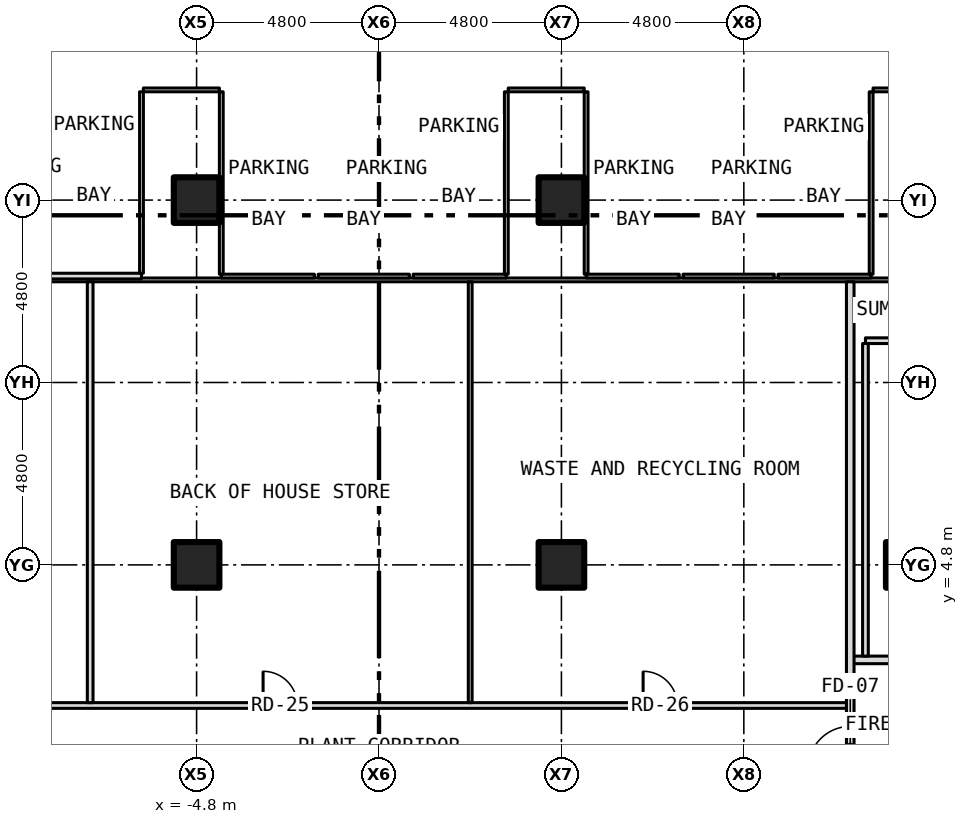
"""IFC4 building model, lengths in metres.
Left out: names, types, materials, properties, quantities, classifications, styles, units other than length and angle.
Written with IfcOpenShell. Run it as: python <this file> out.ifc"""

import sys

from ifc_helpers import new_model, si_unit, direction, frame, frame_2d, origin, origin_2d, place, context, subcontext, project, spatial, rectangle, hollow_rectangle, extrude, element, fill, save


model = new_model("IFC4")
c1 = context("Model", 3, precision=1e-05, world=origin(), true_north=direction((0.0, 1.0)))
c2 = subcontext(c1, "Body", "Model", "MODEL_VIEW")
j1 = project(units=[si_unit("LENGTHUNIT", "METRE"), si_unit("PLANEANGLEUNIT", "RADIAN")], contexts=[c1])
p1 = place(None, origin())
s1 = spatial("IfcSite", under=j1, at=p1, CompositionType="ELEMENT")
p2 = place(p1, origin())
s2 = spatial("IfcBuilding", under=s1, at=p2, CompositionType="ELEMENT")
p3 = place(p2, frame((0.0, 0.0, -10.0)))
s3 = spatial("IfcBuildingStorey", under=s2, at=p3, CompositionType="ELEMENT", Elevation=-10.0)
for number, where, z_axis, x_axis in (
    (1, (-4.8, 4.8, -0.6), (0.0, 0.0, 1.0), (1.0, 0.0, 0.0)),
    (2, (-4.8, 14.4, -0.6), (0.0, 0.0, 1.0), (1.0, 0.0, 0.0)),
    (3, (4.8, 4.8, -0.6), (0.0, 0.0, 1.0), (1.0, 0.0, 0.0)),
    (4, (4.8, 14.4, -0.6), (0.0, 0.0, 1.0), (1.0, 0.0, 0.0)),
    (5, (13.94, 4.8, -0.6), (0.0, 0.0, 1.0), (1.0, 0.0, 0.0)),
):
    element("IfcColumn", number, at=place(p3, frame(where, z_axis=z_axis, x_axis=x_axis)), inside=s3, PredefinedType="COLUMN", context=c2, shape_type="SweptSolid", body=[
        extrude(hollow_rectangle(XDim=1.2, YDim=1.2, WallThickness=0.07, at=origin_2d()), origin(), (0.0, 0.0, 1.0), 5.3),
    ])
p4 = place(p3, frame((-12.4, 1.1, 0.0), z_axis=(0.0, 0.0, 1.0), x_axis=(1.0, 0.0, 0.0)))
e6 = element("IfcWall", 6, at=p4, inside=s3, PredefinedType="PARTITIONING", context=c2, shape_type="SweptSolid", body=[
    extrude(rectangle(XDim=24.8, YDim=0.15, at=frame_2d((12.4, 0.0))), origin(), (0.0, 0.0, 1.0), 4.7),
])
p5 = place(p4, frame((9.35, 0.0, 0.0)))
e7 = element("IfcOpeningElement", 7, at=p5, cuts=e6, PredefinedType="OPENING", context=c2, shape_type="SweptSolid", body=[
    extrude(rectangle(XDim=0.9, YDim=2.1, at=frame_2d((0.45, 1.05))), frame((0.0, 0.087, 0.0), z_axis=(0.0, -1.0, 0.0), x_axis=(1.0, 0.0, 0.0)), (0.0, 0.0, 1.0), 0.174),
])
p6 = place(p4, frame((19.35, 0.0, 0.0)))
e8 = element("IfcOpeningElement", 8, at=p6, cuts=e6, PredefinedType="OPENING", context=c2, shape_type="SweptSolid", body=[
    extrude(rectangle(XDim=0.9, YDim=2.1, at=frame_2d((0.45, 1.05))), frame((0.0, 0.087, 0.0), z_axis=(0.0, -1.0, 0.0), x_axis=(1.0, 0.0, 0.0)), (0.0, 0.0, 1.0), 0.174),
])
p7 = place(p3, frame((12.4, 2.3, 0.0), z_axis=(0.0, 0.0, 1.0), x_axis=(1.0, 0.0, 0.0)))
e9 = element("IfcWall", 9, at=p7, inside=s3, PredefinedType="PARTITIONING", context=c2, shape_type="SweptSolid", body=[
    extrude(rectangle(XDim=3.28, YDim=0.2, at=frame_2d((1.64, 0.0))), origin(), (0.0, 0.0, 1.0), 4.7),
])
p8 = place(p7, frame((1.34, 0.0, 0.0)))
e10 = element("IfcOpeningElement", 10, at=p8, cuts=e9, PredefinedType="OPENING", context=c2, shape_type="SweptSolid", body=[
    extrude(rectangle(XDim=1.1, YDim=2.1, at=frame_2d((0.55, 1.05))), frame((0.0, 0.112, 0.0), z_axis=(0.0, -1.0, 0.0), x_axis=(1.0, 0.0, 0.0)), (0.0, 0.0, 1.0), 0.224),
])
p9 = place(p3, frame((12.8, 10.7, 0.0), z_axis=(0.0, 0.0, 1.0), x_axis=(1.0, 0.0, 0.0)))
e11 = element("IfcWall", 11, at=p9, inside=s3, PredefinedType="PARTITIONING", context=c2, shape_type="SweptSolid", body=[
    extrude(rectangle(XDim=2.88, YDim=0.15, at=frame_2d((1.44, 0.0))), origin(), (0.0, 0.0, 1.0), 4.7),
])
p10 = place(p9, frame((1.05, 0.0, 0.0)))
e12 = element("IfcOpeningElement", 12, at=p10, cuts=e11, PredefinedType="OPENING", context=c2, shape_type="SweptSolid", body=[
    extrude(rectangle(XDim=0.9, YDim=2.1, at=frame_2d((0.45, 1.05))), frame((0.0, 0.087, 0.0), z_axis=(0.0, -1.0, 0.0), x_axis=(1.0, 0.0, 0.0)), (0.0, 0.0, 1.0), 0.174),
])
p11 = place(p3, frame((-37.6, 12.3, 0.0), z_axis=(0.0, 0.0, 1.0), x_axis=(1.0, 0.0, 0.0)))
e13 = element("IfcWall", 13, at=p11, inside=s3, PredefinedType="PARTITIONING", context=c2, shape_type="SweptSolid", body=[
    extrude(rectangle(XDim=70.0, YDim=0.1, at=frame_2d((35.0, 0.0))), origin(), (0.0, 0.0, 1.0), 4.7),
])
p12 = place(p3, frame((-8.7, 12.4, 0.0), z_axis=(0.0, 0.0, 1.0), x_axis=(1.0, 0.0, 0.0)))
e14 = element("IfcWall", 14, at=p12, inside=s3, PredefinedType="PARTITIONING", context=c2, shape_type="SweptSolid", body=[
    extrude(rectangle(XDim=2.45, YDim=0.15, at=frame_2d((1.225, 0.0))), origin(), (0.0, 0.0, 1.0), 4.7),
])
p13 = place(p3, frame((-4.15, 12.4, 0.0), z_axis=(0.0, 0.0, 1.0), x_axis=(1.0, 0.0, 0.0)))
e15 = element("IfcWall", 15, at=p13, inside=s3, PredefinedType="PARTITIONING", context=c2, shape_type="SweptSolid", body=[
    extrude(rectangle(XDim=2.45, YDim=0.1, at=frame_2d((1.225, 0.0))), origin(), (0.0, 0.0, 1.0), 4.7),
])
p14 = place(p3, frame((-1.6, 12.4, 0.0), z_axis=(0.0, 0.0, 1.0), x_axis=(1.0, 0.0, 0.0)))
e16 = element("IfcWall", 16, at=p14, inside=s3, PredefinedType="PARTITIONING", context=c2, shape_type="SweptSolid", body=[
    extrude(rectangle(XDim=2.4, YDim=0.1, at=frame_2d((1.2, 0.0))), origin(), (0.0, 0.0, 1.0), 4.7),
])
p15 = place(p3, frame((0.9, 12.4, 0.0), z_axis=(0.0, 0.0, 1.0), x_axis=(1.0, 0.0, 0.0)))
e17 = element("IfcWall", 17, at=p15, inside=s3, PredefinedType="PARTITIONING", context=c2, shape_type="SweptSolid", body=[
    extrude(rectangle(XDim=2.45, YDim=0.1, at=frame_2d((1.225, 0.0))), origin(), (0.0, 0.0, 1.0), 4.7),
])
p16 = place(p3, frame((5.45, 12.4, 0.0), z_axis=(0.0, 0.0, 1.0), x_axis=(1.0, 0.0, 0.0)))
e18 = element("IfcWall", 18, at=p16, inside=s3, PredefinedType="PARTITIONING", context=c2, shape_type="SweptSolid", body=[
    extrude(rectangle(XDim=2.45, YDim=0.1, at=frame_2d((1.225, 0.0))), origin(), (0.0, 0.0, 1.0), 4.7),
])
p17 = place(p3, frame((8.0, 12.4, 0.0), z_axis=(0.0, 0.0, 1.0), x_axis=(1.0, 0.0, 0.0)))
e19 = element("IfcWall", 19, at=p17, inside=s3, PredefinedType="PARTITIONING", context=c2, shape_type="SweptSolid", body=[
    extrude(rectangle(XDim=2.4, YDim=0.1, at=frame_2d((1.2, 0.0))), origin(), (0.0, 0.0, 1.0), 4.7),
])
p18 = place(p3, frame((10.5, 12.4, 0.0), z_axis=(0.0, 0.0, 1.0), x_axis=(1.0, 0.0, 0.0)))
e20 = element("IfcWall", 20, at=p18, inside=s3, PredefinedType="PARTITIONING", context=c2, shape_type="SweptSolid", body=[
    extrude(rectangle(XDim=2.45, YDim=0.1, at=frame_2d((1.225, 0.0))), origin(), (0.0, 0.0, 1.0), 4.7),
])
for number, where, z_axis, x_axis in (
    (21, (-6.2, 17.3, 0.0), (0.0, 0.0, 1.0), (1.0, 0.0, 0.0)),
    (22, (3.4, 17.3, 0.0), (0.0, 0.0, 1.0), (1.0, 0.0, 0.0)),
    (23, (13.0, 17.3, 0.0), (0.0, 0.0, 1.0), (1.0, 0.0, 0.0)),
):
    element("IfcWall", number, at=place(p3, frame(where, z_axis=z_axis, x_axis=x_axis)), inside=s3, PredefinedType="PARTITIONING", context=c2, shape_type="SweptSolid", body=[
        extrude(rectangle(XDim=2.0, YDim=0.1, at=frame_2d((1.0, 0.0))), origin(), (0.0, 0.0, 1.0), 4.7),
    ])
p19 = place(p3, frame((-7.6, 1.175, 0.0), z_axis=(0.0, 0.0, 1.0), x_axis=(0.0, 1.0, 0.0)))
e24 = element("IfcWall", 24, at=p19, inside=s3, PredefinedType="PARTITIONING", context=c2, shape_type="SweptSolid", body=[
    extrude(rectangle(XDim=11.075, YDim=0.15, at=frame_2d((5.538, 0.0))), origin(), (0.0, 0.0, 1.0), 4.7),
])
p20 = place(p3, frame((-6.25, 12.475, 0.0), z_axis=(0.0, 0.0, 1.0), x_axis=(0.0, 1.0, 0.0)))
e25 = element("IfcWall", 25, at=p20, inside=s3, PredefinedType="PARTITIONING", context=c2, shape_type="SweptSolid", body=[
    extrude(rectangle(XDim=4.775, YDim=0.1, at=frame_2d((2.387, 0.0))), origin(), (0.0, 0.0, 1.0), 4.7),
])
p21 = place(p3, frame((-4.15, 12.45, 0.0), z_axis=(0.0, 0.0, 1.0), x_axis=(0.0, 1.0, 0.0)))
e26 = element("IfcWall", 26, at=p21, inside=s3, PredefinedType="PARTITIONING", context=c2, shape_type="SweptSolid", body=[
    extrude(rectangle(XDim=4.8, YDim=0.1, at=frame_2d((2.4, 0.0))), origin(), (0.0, 0.0, 1.0), 4.7),
])
p22 = place(p3, frame((2.4, 1.175, 0.0), z_axis=(0.0, 0.0, 1.0), x_axis=(0.0, 1.0, 0.0)))
e27 = element("IfcWall", 27, at=p22, inside=s3, PredefinedType="PARTITIONING", context=c2, shape_type="SweptSolid", body=[
    extrude(rectangle(XDim=11.075, YDim=0.1, at=frame_2d((5.538, 0.0))), origin(), (0.0, 0.0, 1.0), 4.7),
])
for number, where, z_axis, x_axis in (
    (28, (3.35, 12.45, 0.0), (0.0, 0.0, 1.0), (0.0, 1.0, 0.0)),
    (29, (5.45, 12.45, 0.0), (0.0, 0.0, 1.0), (0.0, 1.0, 0.0)),
):
    element("IfcWall", number, at=place(p3, frame(where, z_axis=z_axis, x_axis=x_axis)), inside=s3, PredefinedType="PARTITIONING", context=c2, shape_type="SweptSolid", body=[
        extrude(rectangle(XDim=4.8, YDim=0.1, at=frame_2d((2.4, 0.0))), origin(), (0.0, 0.0, 1.0), 4.7),
    ])
p23 = place(p3, frame((12.4, -10.725, 0.0), z_axis=(0.0, 0.0, 1.0), x_axis=(0.0, 1.0, 0.0)))
e30 = element("IfcWall", 30, at=p23, inside=s3, PredefinedType="PARTITIONING", context=c2, shape_type="SweptSolid", body=[
    extrude(rectangle(XDim=22.975, YDim=0.2, at=frame_2d((11.488, 0.0))), origin(), (0.0, 0.0, 1.0), 4.7),
])
p24 = place(p23, frame((10.175, 0.0, 0.0)))
e31 = element("IfcOpeningElement", 31, at=p24, cuts=e30, PredefinedType="OPENING", context=c2, shape_type="SweptSolid", body=[
    extrude(rectangle(XDim=1.1, YDim=2.1, at=frame_2d((0.55, 1.05))), frame((0.0, 0.112, 0.0), z_axis=(0.0, -1.0, 0.0), x_axis=(1.0, 0.0, 0.0)), (0.0, 0.0, 1.0), 0.224),
])
p25 = place(p3, frame((12.8, 2.4, 0.0), z_axis=(0.0, 0.0, 1.0), x_axis=(0.0, 1.0, 0.0)))
e32 = element("IfcWall", 32, at=p25, inside=s3, PredefinedType="PARTITIONING", context=c2, shape_type="SweptSolid", body=[
    extrude(rectangle(XDim=8.225, YDim=0.15, at=frame_2d((4.113, 0.0))), origin(), (0.0, 0.0, 1.0), 4.7),
])
p26 = place(p3, frame((12.95, 12.45, 0.0), z_axis=(0.0, 0.0, 1.0), x_axis=(0.0, 1.0, 0.0)))
e33 = element("IfcWall", 33, at=p26, inside=s3, PredefinedType="PARTITIONING", context=c2, shape_type="SweptSolid", body=[
    extrude(rectangle(XDim=4.8, YDim=0.1, at=frame_2d((2.4, 0.0))), origin(), (0.0, 0.0, 1.0), 4.7),
])
p27 = place(p24, origin())
e34 = element("IfcDoor", 34, at=p27, inside=s3, OperationType="SINGLE_SWING_LEFT", PredefinedType="DOOR", context=c2, shape_type="SweptSolid", body=[
    extrude(rectangle(XDim=1.1, YDim=2.1, at=frame_2d((0.55, 1.05))), frame((0.0, 0.025, 0.0), z_axis=(0.0, -1.0, 0.0), x_axis=(1.0, 0.0, 0.0)), (0.0, 0.0, 1.0), 0.05),
])
fill(e31, e34)
p28 = place(p5, origin())
e35 = element("IfcDoor", 35, at=p28, inside=s3, OperationType="SINGLE_SWING_LEFT", PredefinedType="DOOR", context=c2, shape_type="SweptSolid", body=[
    extrude(rectangle(XDim=0.9, YDim=2.1, at=frame_2d((0.45, 1.05))), frame((0.0, 0.025, 0.0), z_axis=(0.0, -1.0, 0.0), x_axis=(1.0, 0.0, 0.0)), (0.0, 0.0, 1.0), 0.05),
])
fill(e7, e35)
p29 = place(p6, origin())
e36 = element("IfcDoor", 36, at=p29, inside=s3, OperationType="SINGLE_SWING_LEFT", PredefinedType="DOOR", context=c2, shape_type="SweptSolid", body=[
    extrude(rectangle(XDim=0.9, YDim=2.1, at=frame_2d((0.45, 1.05))), frame((0.0, 0.025, 0.0), z_axis=(0.0, -1.0, 0.0), x_axis=(1.0, 0.0, 0.0)), (0.0, 0.0, 1.0), 0.05),
])
fill(e8, e36)
save(model, sys.argv[1])
